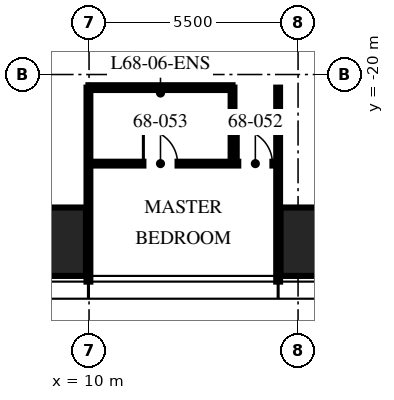
"""IFC4 building model, lengths in metres.
Left out: names, types, materials, properties, quantities, classifications, styles, units other than length and angle.
Written with IfcOpenShell. Run it as: python <this file> out.ifc"""

import sys

from ifc_helpers import new_model, si_unit, direction, frame, frame_2d, origin, origin_2d, place, context, subcontext, project, spatial, rectangle, hollow_rectangle, extrude, element, fill, save


model = new_model("IFC4")
c1 = context("Model", 3, precision=1e-05, world=origin(), true_north=direction((0.0, 1.0)))
c2 = subcontext(c1, "Body", "Model", "MODEL_VIEW")
j1 = project(units=[si_unit("LENGTHUNIT", "METRE"), si_unit("PLANEANGLEUNIT", "RADIAN")], contexts=[c1])
p1 = place(None, origin())
s1 = spatial("IfcSite", under=j1, at=p1, CompositionType="ELEMENT")
p2 = place(p1, origin())
s2 = spatial("IfcBuilding", under=s1, at=p2, CompositionType="ELEMENT")
p3 = place(p2, frame((0.0, 0.0, 270.75)))
s3 = spatial("IfcBuildingStorey", under=s2, at=p3, CompositionType="ELEMENT", Elevation=270.75)
for number, where, z_axis, x_axis in (
    (1, (16.64, -24.4, 0.0), (0.0, 0.0, 1.0), (1.0, 0.0, 0.0)),
    (2, (8.32, -24.4, 0.0), (0.0, 0.0, 1.0), (1.0, 0.0, 0.0)),
):
    element("IfcColumn", number, at=place(p3, frame(where, z_axis=z_axis, x_axis=x_axis)), inside=s3, PredefinedType="COLUMN", context=c2, shape_type="SweptSolid", body=[
        extrude(hollow_rectangle(XDim=3.2, YDim=1.8, WallThickness=0.14, at=origin_2d()), origin(), (0.0, 0.0, 1.0), 3.75),
    ])
for number, where, z_axis, x_axis in (
    (3, (9.984, -20.345, 0.0), (0.0, 0.0, 1.0), (0.0, -1.0, 0.0)),
    (4, (14.976, -20.345, 0.0), (0.0, 0.0, 1.0), (0.0, -1.0, 0.0)),
):
    element("IfcWall", number, at=place(p3, frame(where, z_axis=z_axis, x_axis=x_axis)), inside=s3, PredefinedType="PARTITIONING", context=c2, shape_type="SweptSolid", body=[
        extrude(rectangle(XDim=5.105, YDim=0.1, at=frame_2d((2.552, 0.0))), origin(), (0.0, 0.0, 1.0), 2.81),
    ])
p4 = place(p3, frame((9.984, -22.345, 0.0), z_axis=(0.0, 0.0, 1.0), x_axis=(1.0, 0.0, 0.0)))
e5 = element("IfcWall", 5, at=p4, inside=s3, PredefinedType="PARTITIONING", context=c2, shape_type="SweptSolid", body=[
    extrude(rectangle(XDim=4.992, YDim=0.1, at=frame_2d((2.496, 0.0))), origin(), (0.0, 0.0, 1.0), 2.71),
])
p5 = place(p4, frame((3.942, 0.0, 0.0)))
e6 = element("IfcOpeningElement", 6, at=p5, cuts=e5, PredefinedType="OPENING", context=c2, shape_type="SweptSolid", body=[
    extrude(rectangle(XDim=0.9, YDim=2.1, at=frame_2d((0.45, 1.05))), frame((0.0, 0.06, 0.0), z_axis=(0.0, -1.0, 0.0), x_axis=(1.0, 0.0, 0.0)), (0.0, 0.0, 1.0), 0.12),
])
p6 = place(p4, frame((1.446, 0.0, 0.0)))
e7 = element("IfcOpeningElement", 7, at=p6, cuts=e5, PredefinedType="OPENING", context=c2, shape_type="SweptSolid", body=[
    extrude(rectangle(XDim=0.9, YDim=2.1, at=frame_2d((0.45, 1.05))), frame((0.0, 0.06, 0.0), z_axis=(0.0, -1.0, 0.0), x_axis=(1.0, 0.0, 0.0)), (0.0, 0.0, 1.0), 0.12),
])
p7 = place(p3, frame((13.776, -20.345, 0.0), z_axis=(0.0, 0.0, 1.0), x_axis=(0.0, -1.0, 0.0)))
e8 = element("IfcWall", 8, at=p7, inside=s3, PredefinedType="PARTITIONING", context=c2, shape_type="SweptSolid", body=[
    extrude(rectangle(XDim=2.0, YDim=0.1, at=frame_2d((1.0, 0.0))), origin(), (0.0, 0.0, 1.0), 3.5),
])
p8 = place(p3, frame((9.984, -20.345, 0.0), z_axis=(0.0, 0.0, 1.0), x_axis=(1.0, 0.0, 0.0)))
e9 = element("IfcWall", 9, at=p8, inside=s3, PredefinedType="PARTITIONING", context=c2, shape_type="SweptSolid", body=[
    extrude(rectangle(XDim=3.792, YDim=0.125, at=frame_2d((1.896, 0.0))), origin(), (0.0, 0.0, 1.0), 2.71),
])
p9 = place(p5, origin())
e10 = element("IfcDoor", 10, at=p9, inside=s3, OperationType="SINGLE_SWING_LEFT", PredefinedType="DOOR", context=c2, shape_type="SweptSolid", body=[
    extrude(rectangle(XDim=0.9, YDim=2.1, at=frame_2d((0.45, 1.05))), frame((0.0, 0.025, 0.0), z_axis=(0.0, -1.0, 0.0), x_axis=(1.0, 0.0, 0.0)), (0.0, 0.0, 1.0), 0.05),
])
fill(e6, e10)
p10 = place(p6, origin())
e11 = element("IfcDoor", 11, at=p10, inside=s3, OperationType="SINGLE_SWING_LEFT", PredefinedType="DOOR", context=c2, shape_type="SweptSolid", body=[
    extrude(rectangle(XDim=0.9, YDim=2.1, at=frame_2d((0.45, 1.05))), frame((0.0, 0.025, 0.0), z_axis=(0.0, -1.0, 0.0), x_axis=(1.0, 0.0, 0.0)), (0.0, 0.0, 1.0), 0.05),
])
fill(e7, e11)
save(model, sys.argv[1])
